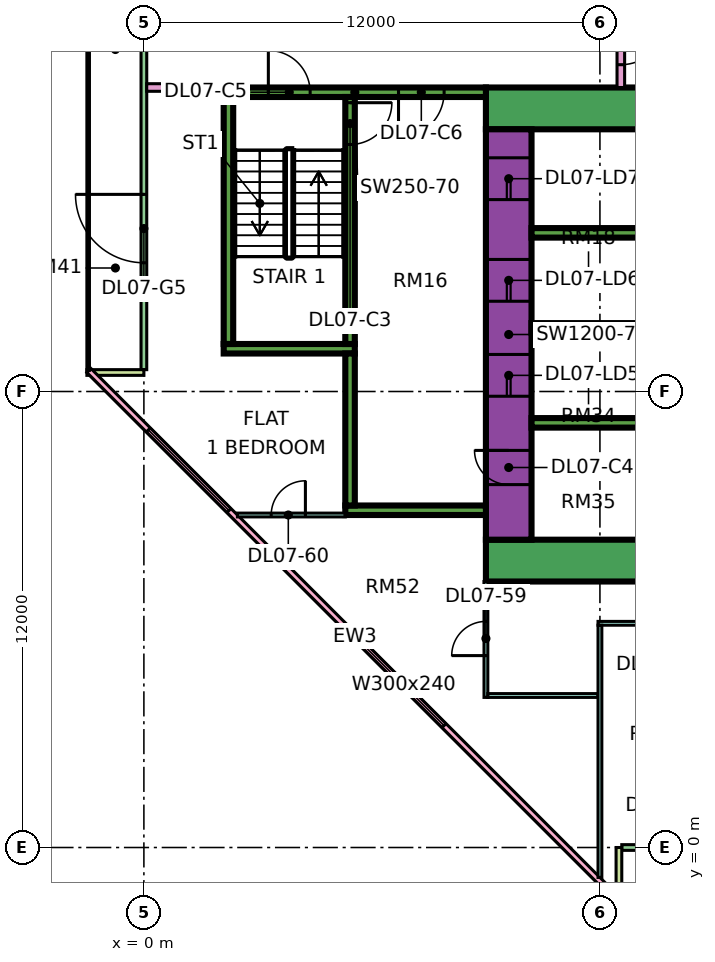
"""IFC4 building model, lengths in metres.
Left out: names, types, materials, properties, quantities, classifications, styles, units other than length and angle.
Written with IfcOpenShell. Run it as: python <this file> out.ifc"""

import sys

from ifc_helpers import new_model, si_unit, direction, frame, frame_2d, origin, place, context, subcontext, project, spatial, rectangle, extrude, element, fill, save


model = new_model("IFC4")
c1 = context("Model", 3, precision=1e-05, world=origin(), true_north=direction((0.0, 1.0)))
c2 = subcontext(c1, "Body", "Model", "MODEL_VIEW")
j1 = project(units=[si_unit("LENGTHUNIT", "METRE"), si_unit("PLANEANGLEUNIT", "RADIAN")], contexts=[c1])
p1 = place(None, origin())
s1 = spatial("IfcSite", under=j1, at=p1, CompositionType="ELEMENT")
p2 = place(p1, origin())
s2 = spatial("IfcBuilding", under=s1, at=p2, CompositionType="ELEMENT")
p3 = place(p2, frame((0.0, 0.0, 41.4)))
s3 = spatial("IfcBuildingStorey", under=s2, at=p3, CompositionType="ELEMENT", Elevation=41.4)
p4 = place(p3, frame((9.0, 7.55, 0.0), z_axis=(0.0, 0.0, 1.0), x_axis=(1.0, 0.0, 0.0)))
e1 = element("IfcWall", 1, at=p4, inside=s3, PredefinedType="SHEAR", context=c2, shape_type="SweptSolid", body=[
    extrude(rectangle(XDim=25.0, YDim=1.1, at=frame_2d((12.5, 0.0))), origin(), (0.0, 0.0, 1.0), 3.75),
])
p5 = place(p3, frame((9.0, 19.45, 0.0), z_axis=(0.0, 0.0, 1.0), x_axis=(1.0, 0.0, 0.0)))
e2 = element("IfcWall", 2, at=p5, inside=s3, PredefinedType="SHEAR", context=c2, shape_type="SweptSolid", body=[
    extrude(rectangle(XDim=25.0, YDim=1.1, at=frame_2d((12.5, 0.0))), origin(), (0.0, 0.0, 1.0), 3.75),
])
p6 = place(p5, frame((19.1, 0.0, 0.0)))
e3 = element("IfcOpeningElement", 3, at=p6, cuts=e2, PredefinedType="OPENING", context=c2, shape_type="SweptSolid", body=[
    extrude(rectangle(XDim=1.8, YDim=2.4, at=frame_2d((0.9, 1.2))), frame((0.0, 0.56, 0.0), z_axis=(0.0, -1.0, 0.0), x_axis=(1.0, 0.0, 0.0)), (0.0, 0.0, 1.0), 1.12),
])
p7 = place(p3, frame((9.6, 8.1, 0.0), z_axis=(0.0, 0.0, 1.0), x_axis=(0.0, 1.0, 0.0)))
e4 = element("IfcWall", 4, at=p7, inside=s3, PredefinedType="SHEAR", context=c2, shape_type="SweptSolid", body=[
    extrude(rectangle(XDim=10.8, YDim=1.2, at=frame_2d((5.4, 0.0))), origin(), (0.0, 0.0, 1.0), 3.75),
])
p8 = place(p7, frame((3.775, 0.0, 0.0)))
e5 = element("IfcOpeningElement", 5, at=p8, cuts=e4, PredefinedType="OPENING", context=c2, shape_type="SweptSolid", body=[
    extrude(rectangle(XDim=1.1, YDim=2.2, at=frame_2d((0.55, 1.1))), frame((0.0, 0.61, 0.0), z_axis=(0.0, -1.0, 0.0), x_axis=(1.0, 0.0, 0.0)), (0.0, 0.0, 1.0), 1.22),
])
p9 = place(p7, frame((6.275, 0.0, 0.0)))
e6 = element("IfcOpeningElement", 6, at=p9, cuts=e4, PredefinedType="OPENING", context=c2, shape_type="SweptSolid", body=[
    extrude(rectangle(XDim=1.1, YDim=2.2, at=frame_2d((0.55, 1.1))), frame((0.0, 0.61, 0.0), z_axis=(0.0, -1.0, 0.0), x_axis=(1.0, 0.0, 0.0)), (0.0, 0.0, 1.0), 1.22),
])
p10 = place(p7, frame((8.95, 0.0, 0.0)))
e7 = element("IfcOpeningElement", 7, at=p10, cuts=e4, PredefinedType="OPENING", context=c2, shape_type="SweptSolid", body=[
    extrude(rectangle(XDim=1.1, YDim=2.2, at=frame_2d((0.55, 1.1))), frame((0.0, 0.61, 0.0), z_axis=(0.0, -1.0, 0.0), x_axis=(1.0, 0.0, 0.0)), (0.0, 0.0, 1.0), 1.22),
])
p11 = place(p7, frame((1.45, 0.0, 0.0)))
e8 = element("IfcOpeningElement", 8, at=p11, cuts=e4, PredefinedType="OPENING", context=c2, shape_type="SweptSolid", body=[
    extrude(rectangle(XDim=0.9, YDim=2.1, at=frame_2d((0.45, 1.05))), frame((0.0, 0.61, 0.0), z_axis=(0.0, -1.0, 0.0), x_axis=(1.0, 0.0, 0.0)), (0.0, 0.0, 1.0), 1.22),
])
for number, where, z_axis, x_axis in (
    (9, (10.2, 11.175, 0.0), (0.0, 0.0, 1.0), (1.0, 0.0, 0.0)),
    (10, (10.2, 13.675, 0.0), (0.0, 0.0, 1.0), (1.0, 0.0, 0.0)),
    (11, (10.2, 16.175, 0.0), (0.0, 0.0, 1.0), (1.0, 0.0, 0.0)),
):
    element("IfcWall", number, at=place(p3, frame(where, z_axis=z_axis, x_axis=x_axis)), inside=s3, PredefinedType="SHEAR", context=c2, shape_type="SweptSolid", body=[
        extrude(rectangle(XDim=3.0, YDim=0.25, at=frame_2d((1.5, 0.0))), origin(), (0.0, 0.0, 1.0), 3.75),
    ])
p12 = place(p3, frame((2.1, 19.875, 0.0), z_axis=(0.0, 0.0, 1.0), x_axis=(1.0, 0.0, 0.0)))
e12 = element("IfcWall", 12, at=p12, inside=s3, PredefinedType="SHEAR", context=c2, shape_type="SweptSolid", body=[
    extrude(rectangle(XDim=6.9, YDim=0.25, at=frame_2d((3.45, 0.0))), origin(), (0.0, 0.0, 1.0), 3.75),
])
p13 = place(p12, frame((1.175, 0.0, 0.0)))
e13 = element("IfcOpeningElement", 13, at=p13, cuts=e12, PredefinedType="OPENING", context=c2, shape_type="SweptSolid", body=[
    extrude(rectangle(XDim=1.1, YDim=2.2, at=frame_2d((0.55, 1.1))), frame((0.0, 0.135, 0.0), z_axis=(0.0, -1.0, 0.0), x_axis=(1.0, 0.0, 0.0)), (0.0, 0.0, 1.0), 0.27),
])
p14 = place(p12, frame((4.6, 0.0, 0.0)))
e14 = element("IfcOpeningElement", 14, at=p14, cuts=e12, PredefinedType="OPENING", context=c2, shape_type="SweptSolid", body=[
    extrude(rectangle(XDim=1.2, YDim=2.2, at=frame_2d((0.6, 1.1))), frame((0.0, 0.135, 0.0), z_axis=(0.0, -1.0, 0.0), x_axis=(1.0, 0.0, 0.0)), (0.0, 0.0, 1.0), 0.27),
])
p15 = place(p3, frame((2.1, 13.125, 0.0), z_axis=(0.0, 0.0, 1.0), x_axis=(1.0, 0.0, 0.0)))
e15 = element("IfcWall", 15, at=p15, inside=s3, PredefinedType="SHEAR", context=c2, shape_type="SweptSolid", body=[
    extrude(rectangle(XDim=3.45, YDim=0.25, at=frame_2d((1.725, 0.0))), origin(), (0.0, 0.0, 1.0), 3.75),
])
p16 = place(p3, frame((2.225, 13.25, 0.0), z_axis=(0.0, 0.0, 1.0), x_axis=(0.0, 1.0, 0.0)))
e16 = element("IfcWall", 16, at=p16, inside=s3, PredefinedType="SHEAR", context=c2, shape_type="SweptSolid", body=[
    extrude(rectangle(XDim=6.5, YDim=0.25, at=frame_2d((3.25, 0.0))), origin(), (0.0, 0.0, 1.0), 3.75),
])
p17 = place(p3, frame((5.425, 13.25, 0.0), z_axis=(0.0, 0.0, 1.0), x_axis=(0.0, 1.0, 0.0)))
e17 = element("IfcWall", 17, at=p17, inside=s3, PredefinedType="SHEAR", context=c2, shape_type="SweptSolid", body=[
    extrude(rectangle(XDim=6.5, YDim=0.25, at=frame_2d((3.25, 0.0))), origin(), (0.0, 0.0, 1.0), 3.75),
])
p18 = place(p17, frame((5.25, 0.0, 0.0)))
e18 = element("IfcOpeningElement", 18, at=p18, cuts=e17, PredefinedType="OPENING", context=c2, shape_type="SweptSolid", body=[
    extrude(rectangle(XDim=1.1, YDim=2.2, at=frame_2d((0.55, 1.1))), frame((0.0, 0.135, 0.0), z_axis=(0.0, -1.0, 0.0), x_axis=(1.0, 0.0, 0.0)), (0.0, 0.0, 1.0), 0.27),
])
p19 = place(p3, frame((5.3, 8.875, 0.0), z_axis=(0.0, 0.0, 1.0), x_axis=(1.0, 0.0, 0.0)))
e19 = element("IfcWall", 19, at=p19, inside=s3, PredefinedType="SHEAR", context=c2, shape_type="SweptSolid", body=[
    extrude(rectangle(XDim=3.7, YDim=0.25, at=frame_2d((1.85, 0.0))), origin(), (0.0, 0.0, 1.0), 3.75),
])
p20 = place(p3, frame((5.425, 9.0, 0.0), z_axis=(0.0, 0.0, 1.0), x_axis=(0.0, 1.0, 0.0)))
e20 = element("IfcWall", 20, at=p20, inside=s3, PredefinedType="SHEAR", context=c2, shape_type="SweptSolid", body=[
    extrude(rectangle(XDim=4.0, YDim=0.25, at=frame_2d((2.0, 0.0))), origin(), (0.0, 0.0, 1.0), 3.75),
])
p21 = place(p3, frame((0.0, 23.925, 0.0), z_axis=(0.0, 0.0, 1.0), x_axis=(0.0, -1.0, 0.0)))
e21 = element("IfcWall", 21, at=p21, inside=s3, PredefinedType="SOLIDWALL", context=c2, shape_type="SweptSolid", body=[
    extrude(rectangle(XDim=11.35, YDim=0.15, at=frame_2d((5.675, 0.0))), origin(), (0.0, 0.0, 1.0), 3.35),
])
p22 = place(p21, frame((6.738, 0.0, 0.0)))
e22 = element("IfcOpeningElement", 22, at=p22, cuts=e21, PredefinedType="OPENING", context=c2, shape_type="SweptSolid", body=[
    extrude(rectangle(XDim=1.8, YDim=2.4, at=frame_2d((0.9, 1.2))), frame((0.0, 0.085, 0.0), z_axis=(0.0, -1.0, 0.0), x_axis=(1.0, 0.0, 0.0)), (0.0, 0.0, 1.0), 0.17),
])
p23 = place(p3, frame((-1.5, 12.5, 0.0), z_axis=(0.0, 0.0, 1.0), x_axis=(1.0, 0.0, 0.0)))
e23 = element("IfcWall", 23, at=p23, inside=s3, PredefinedType="SOLIDWALL", context=c2, shape_type="SweptSolid", body=[
    extrude(rectangle(XDim=1.5, YDim=0.15, at=frame_2d((0.75, 0.0))), origin(), (0.0, 0.0, 1.0), 3.35),
])
p24 = place(p3, frame((-1.447, 12.553, 0.0), z_axis=(0.0, 0.0, 1.0), x_axis=(0.707106781187, -0.707106781187, 0.0)))
e24 = element("IfcWall", 24, at=p24, inside=s3, PredefinedType="SOLIDWALL", context=c2, shape_type="SweptSolid", body=[
    extrude(rectangle(XDim=19.799, YDim=0.15, at=frame_2d((9.899, 0.0))), origin(), (0.0, 0.0, 1.0), 3.35),
])
p25 = place(p24, frame((2.212, 0.0, 0.45)))
e25 = element("IfcOpeningElement", 25, at=p25, cuts=e24, PredefinedType="OPENING", context=c2, shape_type="SweptSolid", body=[
    extrude(rectangle(XDim=3.0, YDim=2.4, at=frame_2d((1.5, 1.2))), frame((0.0, 0.085, 0.0), z_axis=(0.0, -1.0, 0.0), x_axis=(1.0, 0.0, 0.0)), (0.0, 0.0, 1.0), 0.17),
])
p26 = place(p24, frame((10.216, 0.0, 0.45)))
e26 = element("IfcOpeningElement", 26, at=p26, cuts=e24, PredefinedType="OPENING", context=c2, shape_type="SweptSolid", body=[
    extrude(rectangle(XDim=3.0, YDim=2.4, at=frame_2d((1.5, 1.2))), frame((0.0, 0.085, 0.0), z_axis=(0.0, -1.0, 0.0), x_axis=(1.0, 0.0, 0.0)), (0.0, 0.0, 1.0), 0.17),
])
p27 = place(p3, frame((12.575, 0.0, 0.0), z_axis=(0.0, 0.0, 1.0), x_axis=(1.0, 0.0, 0.0)))
e27 = element("IfcWall", 27, at=p27, inside=s3, PredefinedType="SOLIDWALL", context=c2, shape_type="SweptSolid", body=[
    extrude(rectangle(XDim=11.35, YDim=0.15, at=frame_2d((5.675, 0.0))), origin(), (0.0, 0.0, 1.0), 3.35),
])
p28 = place(p27, frame((0.613, 0.0, 0.0)))
e28 = element("IfcOpeningElement", 28, at=p28, cuts=e27, PredefinedType="OPENING", context=c2, shape_type="SweptSolid", body=[
    extrude(rectangle(XDim=1.2, YDim=2.4, at=frame_2d((0.6, 1.2))), frame((0.0, 0.085, 0.0), z_axis=(0.0, -1.0, 0.0), x_axis=(1.0, 0.0, 0.0)), (0.0, 0.0, 1.0), 0.17),
])
p29 = place(p27, frame((3.025, 0.0, 0.45)))
e29 = element("IfcOpeningElement", 29, at=p29, cuts=e27, PredefinedType="OPENING", context=c2, shape_type="SweptSolid", body=[
    extrude(rectangle(XDim=1.8, YDim=2.4, at=frame_2d((0.9, 1.2))), frame((0.0, 0.085, 0.0), z_axis=(0.0, -1.0, 0.0), x_axis=(1.0, 0.0, 0.0)), (0.0, 0.0, 1.0), 0.17),
])
p30 = place(p27, frame((6.6, 0.0, 0.45)))
e30 = element("IfcOpeningElement", 30, at=p30, cuts=e27, PredefinedType="OPENING", context=c2, shape_type="SweptSolid", body=[
    extrude(rectangle(XDim=3.0, YDim=2.4, at=frame_2d((1.5, 1.2))), frame((0.0, 0.085, 0.0), z_axis=(0.0, -1.0, 0.0), x_axis=(1.0, 0.0, 0.0)), (0.0, 0.0, 1.0), 0.17),
])
p31 = place(p3, frame((12.5, -1.5, 0.0), z_axis=(0.0, 0.0, 1.0), x_axis=(0.0, 1.0, 0.0)))
e31 = element("IfcWall", 31, at=p31, inside=s3, PredefinedType="SOLIDWALL", context=c2, shape_type="SweptSolid", body=[
    extrude(rectangle(XDim=1.5, YDim=0.15, at=frame_2d((0.75, 0.0))), origin(), (0.0, 0.0, 1.0), 3.35),
])
p32 = place(p3, frame((0.074, 20.0, 0.0), z_axis=(0.0, 0.0, 1.0), x_axis=(1.0, 0.0, 0.0)))
e32 = element("IfcWall", 32, at=p32, inside=s3, PredefinedType="PARTITIONING", context=c2, shape_type="SweptSolid", body=[
    extrude(rectangle(XDim=2.026, YDim=0.2, at=frame_2d((1.013, 0.0))), origin(), (0.0, 0.0, 1.0), 3.35),
])
p33 = place(p3, frame((2.461, 8.75, 0.0), z_axis=(0.0, 0.0, 1.0), x_axis=(1.0, 0.0, 0.0)))
e33 = element("IfcWall", 33, at=p33, inside=s3, PredefinedType="PARTITIONING", context=c2, shape_type="SweptSolid", body=[
    extrude(rectangle(XDim=2.839, YDim=0.1, at=frame_2d((1.419, 0.0))), origin(), (0.0, 0.0, 1.0), 3.35),
])
p34 = place(p33, frame((0.889, 0.0, 0.0)))
e34 = element("IfcOpeningElement", 34, at=p34, cuts=e33, PredefinedType="OPENING", context=c2, shape_type="SweptSolid", body=[
    extrude(rectangle(XDim=0.9, YDim=2.1, at=frame_2d((0.45, 1.05))), frame((0.0, 0.06, 0.0), z_axis=(0.0, -1.0, 0.0), x_axis=(1.0, 0.0, 0.0)), (0.0, 0.0, 1.0), 0.12),
])
p35 = place(p3, frame((9.0, 3.95, 0.0), z_axis=(0.0, 0.0, 1.0), x_axis=(0.0, 1.0, 0.0)))
e35 = element("IfcWall", 35, at=p35, inside=s3, PredefinedType="PARTITIONING", context=c2, shape_type="SweptSolid", body=[
    extrude(rectangle(XDim=3.05, YDim=0.1, at=frame_2d((1.525, 0.0))), origin(), (0.0, 0.0, 1.0), 3.35),
])
p36 = place(p35, frame((1.1, 0.0, 0.0)))
e36 = element("IfcOpeningElement", 36, at=p36, cuts=e35, PredefinedType="OPENING", context=c2, shape_type="SweptSolid", body=[
    extrude(rectangle(XDim=0.9, YDim=2.1, at=frame_2d((0.45, 1.05))), frame((0.0, 0.06, 0.0), z_axis=(0.0, -1.0, 0.0), x_axis=(1.0, 0.0, 0.0)), (0.0, 0.0, 1.0), 0.12),
])
p37 = place(p3, frame((9.05, 4.0, 0.0), z_axis=(0.0, 0.0, 1.0), x_axis=(1.0, 0.0, 0.0)))
e37 = element("IfcWall", 37, at=p37, inside=s3, PredefinedType="PARTITIONING", context=c2, shape_type="SweptSolid", body=[
    extrude(rectangle(XDim=2.9, YDim=0.1, at=frame_2d((1.45, 0.0))), origin(), (0.0, 0.0, 1.0), 3.35),
])
p38 = place(p3, frame((11.95, 5.9, 0.0), z_axis=(0.0, 0.0, 1.0), x_axis=(1.0, 0.0, 0.0)))
e38 = element("IfcWall", 38, at=p38, inside=s3, PredefinedType="PARTITIONING", context=c2, shape_type="SweptSolid", body=[
    extrude(rectangle(XDim=21.1, YDim=0.1, at=frame_2d((10.55, 0.0))), origin(), (0.0, 0.0, 1.0), 3.35),
])
p39 = place(p38, frame((1.1, 0.0, 0.0)))
e39 = element("IfcOpeningElement", 39, at=p39, cuts=e38, PredefinedType="OPENING", context=c2, shape_type="SweptSolid", body=[
    extrude(rectangle(XDim=0.9, YDim=2.1, at=frame_2d((0.45, 1.05))), frame((0.0, 0.06, 0.0), z_axis=(0.0, -1.0, 0.0), x_axis=(1.0, 0.0, 0.0)), (0.0, 0.0, 1.0), 0.12),
])
p40 = place(p38, frame((4.1, 0.0, 0.0)))
e40 = element("IfcOpeningElement", 40, at=p40, cuts=e38, PredefinedType="OPENING", context=c2, shape_type="SweptSolid", body=[
    extrude(rectangle(XDim=0.9, YDim=2.1, at=frame_2d((0.45, 1.05))), frame((0.0, 0.06, 0.0), z_axis=(0.0, -1.0, 0.0), x_axis=(1.0, 0.0, 0.0)), (0.0, 0.0, 1.0), 0.12),
])
p41 = place(p38, frame((16.1, 0.0, 0.0)))
e41 = element("IfcOpeningElement", 41, at=p41, cuts=e38, PredefinedType="OPENING", context=c2, shape_type="SweptSolid", body=[
    extrude(rectangle(XDim=0.9, YDim=2.1, at=frame_2d((0.45, 1.05))), frame((0.0, 0.06, 0.0), z_axis=(0.0, -1.0, 0.0), x_axis=(1.0, 0.0, 0.0)), (0.0, 0.0, 1.0), 0.12),
])
p42 = place(p38, frame((10.1, 0.0, 0.0)))
e42 = element("IfcOpeningElement", 42, at=p42, cuts=e38, PredefinedType="OPENING", context=c2, shape_type="SweptSolid", body=[
    extrude(rectangle(XDim=0.9, YDim=2.1, at=frame_2d((0.45, 1.05))), frame((0.0, 0.06, 0.0), z_axis=(0.0, -1.0, 0.0), x_axis=(1.0, 0.0, 0.0)), (0.0, 0.0, 1.0), 0.12),
])
p43 = place(p3, frame((12.0, -0.788, 0.0), z_axis=(0.0, 0.0, 1.0), x_axis=(0.0, 1.0, 0.0)))
e43 = element("IfcWall", 43, at=p43, inside=s3, PredefinedType="PARTITIONING", context=c2, shape_type="SweptSolid", body=[
    extrude(rectangle(XDim=6.638, YDim=0.1, at=frame_2d((3.319, 0.0))), origin(), (0.0, 0.0, 1.0), 3.35),
])
p44 = place(p3, frame((12.55, 20.0, 0.0), z_axis=(0.0, 0.0, 1.0), x_axis=(0.0, 1.0, 0.0)))
e44 = element("IfcWall", 44, at=p44, inside=s3, PredefinedType="PARTITIONING", context=c2, shape_type="SweptSolid", body=[
    extrude(rectangle(XDim=42.926, YDim=0.2, at=frame_2d((21.463, 0.0))), origin(), (0.0, 0.0, 1.0), 3.35),
])
p45 = place(p44, frame((25.8, 0.0, 0.0)))
e45 = element("IfcOpeningElement", 45, at=p45, cuts=e44, PredefinedType="OPENING", context=c2, shape_type="SweptSolid", body=[
    extrude(rectangle(XDim=1.0, YDim=2.1, at=frame_2d((0.5, 1.05))), frame((0.0, 0.11, 0.0), z_axis=(0.0, -1.0, 0.0), x_axis=(1.0, 0.0, 0.0)), (0.0, 0.0, 1.0), 0.22),
])
p46 = place(p44, frame((37.65, 0.0, 0.0)))
e46 = element("IfcOpeningElement", 46, at=p46, cuts=e44, PredefinedType="OPENING", context=c2, shape_type="SweptSolid", body=[
    extrude(rectangle(XDim=1.0, YDim=2.1, at=frame_2d((0.5, 1.05))), frame((0.0, 0.11, 0.0), z_axis=(0.0, -1.0, 0.0), x_axis=(1.0, 0.0, 0.0)), (0.0, 0.0, 1.0), 0.22),
])
p47 = place(p44, frame((0.6, 0.0, 0.0)))
e47 = element("IfcOpeningElement", 47, at=p47, cuts=e44, PredefinedType="OPENING", context=c2, shape_type="SweptSolid", body=[
    extrude(rectangle(XDim=1.2, YDim=2.1, at=frame_2d((0.6, 1.05))), frame((0.0, 0.11, 0.0), z_axis=(0.0, -1.0, 0.0), x_axis=(1.0, 0.0, 0.0)), (0.0, 0.0, 1.0), 0.22),
])
p48 = place(p44, frame((4.65, 0.0, 0.0)))
e48 = element("IfcOpeningElement", 48, at=p48, cuts=e44, PredefinedType="OPENING", context=c2, shape_type="SweptSolid", body=[
    extrude(rectangle(XDim=1.0, YDim=2.1, at=frame_2d((0.5, 1.05))), frame((0.0, 0.11, 0.0), z_axis=(0.0, -1.0, 0.0), x_axis=(1.0, 0.0, 0.0)), (0.0, 0.0, 1.0), 0.22),
])
p49 = place(p22, frame((1.8, 0.0, 0.0), z_axis=(0.0, 0.0, 1.0), x_axis=(-1.0, 0.0, 0.0)))
e49 = element("IfcDoor", 49, at=p49, inside=s3, OperationType="DOUBLE_DOOR_SINGLE_SWING", PredefinedType="DOOR", context=c2, shape_type="SweptSolid", body=[
    extrude(rectangle(XDim=1.8, YDim=2.4, at=frame_2d((0.9, 1.2))), frame((0.0, 0.025, 0.0), z_axis=(0.0, -1.0, 0.0), x_axis=(1.0, 0.0, 0.0)), (0.0, 0.0, 1.0), 0.05),
])
fill(e22, e49)
p50 = place(p25, origin())
e50 = element("IfcWindow", 50, at=p50, inside=s3, PartitioningType="SINGLE_PANEL", PredefinedType="WINDOW", context=c2, shape_type="SweptSolid", body=[
    extrude(rectangle(XDim=3.0, YDim=2.4, at=frame_2d((1.5, 1.2))), frame((0.0, 0.03, 0.0), z_axis=(0.0, -1.0, 0.0), x_axis=(1.0, 0.0, 0.0)), (0.0, 0.0, 1.0), 0.06),
])
fill(e25, e50)
p51 = place(p26, origin())
e51 = element("IfcWindow", 51, at=p51, inside=s3, PartitioningType="SINGLE_PANEL", PredefinedType="WINDOW", context=c2, shape_type="SweptSolid", body=[
    extrude(rectangle(XDim=3.0, YDim=2.4, at=frame_2d((1.5, 1.2))), frame((0.0, 0.03, 0.0), z_axis=(0.0, -1.0, 0.0), x_axis=(1.0, 0.0, 0.0)), (0.0, 0.0, 1.0), 0.06),
])
fill(e26, e51)
p52 = place(p8, origin())
e52 = element("IfcDoor", 52, at=p52, inside=s3, OperationType="DOUBLE_DOOR_SLIDING", PredefinedType="DOOR", context=c2, shape_type="SweptSolid", body=[
    extrude(rectangle(XDim=1.1, YDim=2.2, at=frame_2d((0.55, 1.1))), frame((0.0, 0.025, 0.0), z_axis=(0.0, -1.0, 0.0), x_axis=(1.0, 0.0, 0.0)), (0.0, 0.0, 1.0), 0.05),
])
fill(e5, e52)
p53 = place(p9, origin())
e53 = element("IfcDoor", 53, at=p53, inside=s3, OperationType="DOUBLE_DOOR_SLIDING", PredefinedType="DOOR", context=c2, shape_type="SweptSolid", body=[
    extrude(rectangle(XDim=1.1, YDim=2.2, at=frame_2d((0.55, 1.1))), frame((0.0, 0.025, 0.0), z_axis=(0.0, -1.0, 0.0), x_axis=(1.0, 0.0, 0.0)), (0.0, 0.0, 1.0), 0.05),
])
fill(e6, e53)
p54 = place(p10, origin())
e54 = element("IfcDoor", 54, at=p54, inside=s3, OperationType="DOUBLE_DOOR_SLIDING", PredefinedType="DOOR", context=c2, shape_type="SweptSolid", body=[
    extrude(rectangle(XDim=1.1, YDim=2.2, at=frame_2d((0.55, 1.1))), frame((0.0, 0.025, 0.0), z_axis=(0.0, -1.0, 0.0), x_axis=(1.0, 0.0, 0.0)), (0.0, 0.0, 1.0), 0.05),
])
fill(e7, e54)
p55 = place(p18, origin())
e55 = element("IfcDoor", 55, at=p55, inside=s3, OperationType="SINGLE_SWING_RIGHT", PredefinedType="DOOR", context=c2, shape_type="SweptSolid", body=[
    extrude(rectangle(XDim=1.1, YDim=2.2, at=frame_2d((0.55, 1.1))), frame((0.0, 0.025, 0.0), z_axis=(0.0, -1.0, 0.0), x_axis=(1.0, 0.0, 0.0)), (0.0, 0.0, 1.0), 0.05),
])
fill(e18, e55)
p56 = place(p11, frame((0.9, 0.0, 0.0), z_axis=(0.0, 0.0, 1.0), x_axis=(-1.0, 0.0, 0.0)))
e56 = element("IfcDoor", 56, at=p56, inside=s3, OperationType="SINGLE_SWING_RIGHT", PredefinedType="DOOR", context=c2, shape_type="SweptSolid", body=[
    extrude(rectangle(XDim=0.9, YDim=2.1, at=frame_2d((0.45, 1.05))), frame((0.0, 0.025, 0.0), z_axis=(0.0, -1.0, 0.0), x_axis=(1.0, 0.0, 0.0)), (0.0, 0.0, 1.0), 0.05),
])
fill(e8, e56)
p57 = place(p13, origin())
e57 = element("IfcDoor", 57, at=p57, inside=s3, OperationType="SINGLE_SWING_LEFT", PredefinedType="DOOR", context=c2, shape_type="SweptSolid", body=[
    extrude(rectangle(XDim=1.1, YDim=2.2, at=frame_2d((0.55, 1.1))), frame((0.0, 0.025, 0.0), z_axis=(0.0, -1.0, 0.0), x_axis=(1.0, 0.0, 0.0)), (0.0, 0.0, 1.0), 0.05),
])
fill(e13, e57)
p58 = place(p14, frame((1.2, 0.0, 0.0), z_axis=(0.0, 0.0, 1.0), x_axis=(-1.0, 0.0, 0.0)))
e58 = element("IfcDoor", 58, at=p58, inside=s3, OperationType="SINGLE_SWING_LEFT", PredefinedType="DOOR", context=c2, shape_type="SweptSolid", body=[
    extrude(rectangle(XDim=1.2, YDim=2.2, at=frame_2d((0.6, 1.1))), frame((0.0, 0.025, 0.0), z_axis=(0.0, -1.0, 0.0), x_axis=(1.0, 0.0, 0.0)), (0.0, 0.0, 1.0), 0.05),
])
fill(e14, e58)
p59 = place(p47, origin())
e59 = element("IfcDoor", 59, at=p59, inside=s3, OperationType="SINGLE_SWING_RIGHT", PredefinedType="DOOR", context=c2, shape_type="SweptSolid", body=[
    extrude(rectangle(XDim=1.2, YDim=2.1, at=frame_2d((0.6, 1.05))), frame((0.0, 0.025, 0.0), z_axis=(0.0, -1.0, 0.0), x_axis=(1.0, 0.0, 0.0)), (0.0, 0.0, 1.0), 0.05),
])
fill(e47, e59)
p60 = place(p36, origin())
e60 = element("IfcDoor", 60, at=p60, inside=s3, OperationType="SINGLE_SWING_LEFT", PredefinedType="DOOR", context=c2, shape_type="SweptSolid", body=[
    extrude(rectangle(XDim=0.9, YDim=2.1, at=frame_2d((0.45, 1.05))), frame((0.0, 0.025, 0.0), z_axis=(0.0, -1.0, 0.0), x_axis=(1.0, 0.0, 0.0)), (0.0, 0.0, 1.0), 0.05),
])
fill(e36, e60)
p61 = place(p34, frame((0.9, 0.0, 0.0), z_axis=(0.0, 0.0, 1.0), x_axis=(-1.0, 0.0, 0.0)))
e61 = element("IfcDoor", 61, at=p61, inside=s3, OperationType="SINGLE_SWING_RIGHT", PredefinedType="DOOR", context=c2, shape_type="SweptSolid", body=[
    extrude(rectangle(XDim=0.9, YDim=2.1, at=frame_2d((0.45, 1.05))), frame((0.0, 0.025, 0.0), z_axis=(0.0, -1.0, 0.0), x_axis=(1.0, 0.0, 0.0)), (0.0, 0.0, 1.0), 0.05),
])
fill(e34, e61)
save(model, sys.argv[1])
